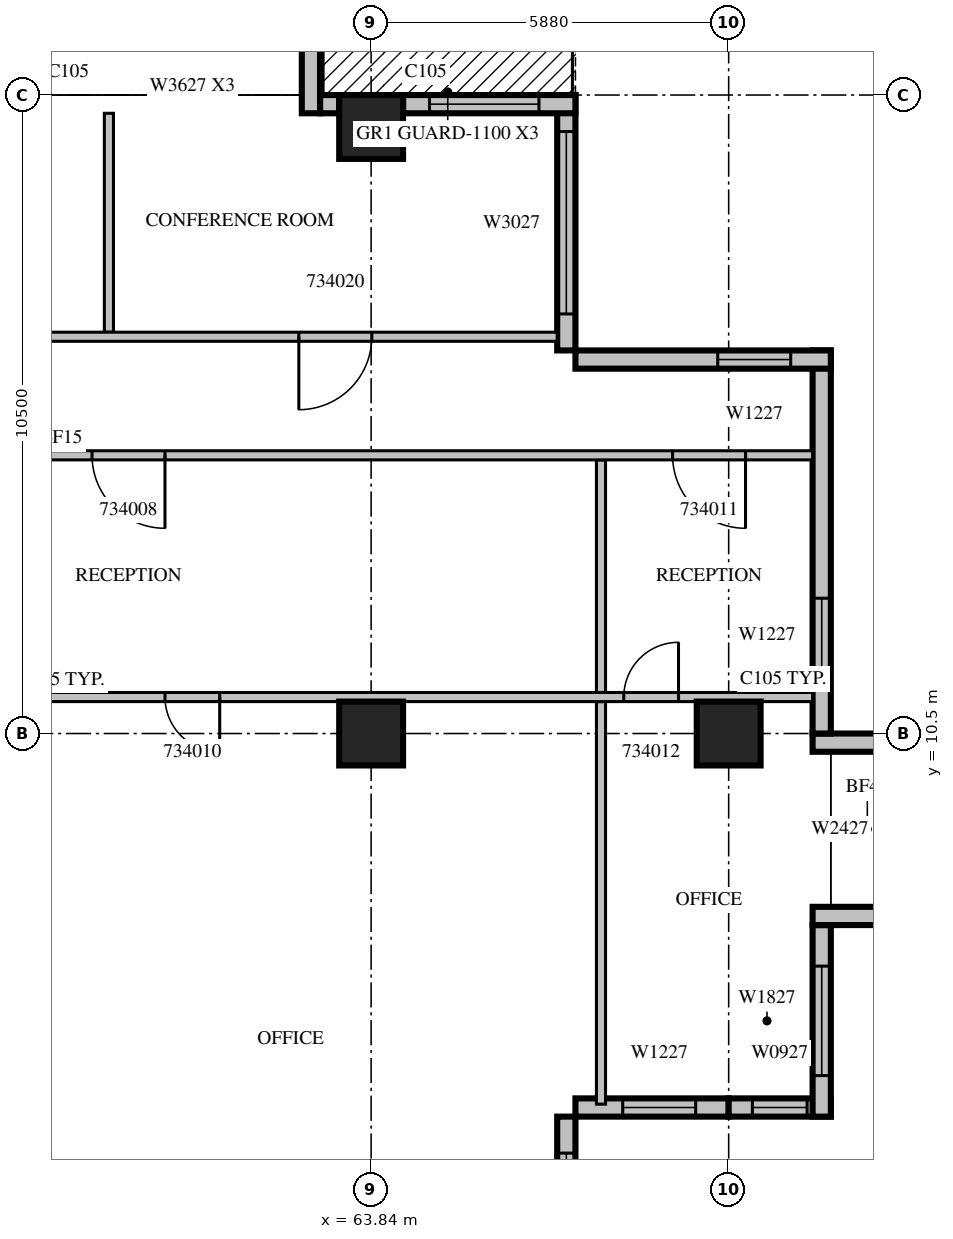
"""IFC4 building model, lengths in metres.
Left out: names, types, materials, properties, quantities, classifications, styles, units other than length and angle.
Written with IfcOpenShell. Run it as: python <this file> out.ifc"""

import sys

from ifc_helpers import new_model, si_unit, direction, frame, frame_2d, origin, origin_2d, place, context, subcontext, project, spatial, rectangle, extrude, source, transform, mapped, element, fill, save


model = new_model("IFC4")
c1 = context("Model", 3, precision=1e-05, world=origin(), true_north=direction((0.0, 1.0)))
c2 = subcontext(c1, "Body", "Model", "MODEL_VIEW")
j1 = project(units=[si_unit("LENGTHUNIT", "METRE"), si_unit("PLANEANGLEUNIT", "RADIAN")], contexts=[c1])
p1 = place(None, origin())
s1 = spatial("IfcSite", under=j1, at=p1, CompositionType="ELEMENT")
p2 = place(p1, origin())
s2 = spatial("IfcBuilding", under=s1, at=p2, CompositionType="ELEMENT")
p3 = place(p2, frame((0.0, 0.0, 153.9)))
s3 = spatial("IfcBuildingStorey", under=s2, at=p3, CompositionType="ELEMENT", Elevation=153.9)
m1 = source(origin(), c2, "Body", "SweptSolid", [
    extrude(rectangle(XDim=1.05, YDim=1.05, at=origin_2d()), origin(), (0.0, 0.0, 1.0), 4.2),
])
for number, where, z_axis, x_axis in (
    (1, (63.84, 10.5, 0.0), (0.0, 0.0, 1.0), (1.0, 0.0, 0.0)),
    (2, (69.72, 10.5, 0.0), (0.0, 0.0, 1.0), (1.0, 0.0, 0.0)),
    (3, (63.84, 20.475, 0.0), (0.0, 0.0, 1.0), (1.0, 0.0, 0.0)),
):
    element("IfcColumn", number, at=place(p3, frame(where, z_axis=z_axis, x_axis=x_axis)), inside=s3, PredefinedType="COLUMN", context=c2, shape_type="MappedRepresentation", body=[
        mapped(m1, transform((0.0, 0.0, 0.0), scale=1.0)),
    ])
m2 = source(origin(), c2, "Body", "SweptSolid", [
    extrude(rectangle(XDim=4.2, YDim=0.3, at=frame_2d((2.1, 0.0))), origin(), (0.0, 0.0, 1.0), 3.8),
])
p4 = place(p3, frame((67.05, 0.0, 0.0), z_axis=(0.0, 0.0, 1.0), x_axis=(0.0, 1.0, 0.0)))
e4 = element("IfcWall", 4, at=p4, inside=s3, PredefinedType="STANDARD", context=c2, shape_type="MappedRepresentation", body=[
    mapped(m2, transform((0.0, 0.0, 0.0), scale=1.0)),
])
m3 = source(origin(), c2, "Body", "SweptSolid", [
    extrude(rectangle(XDim=3.0, YDim=2.7, at=frame_2d((1.5, 1.35))), frame((0.0, 0.16, 0.0), z_axis=(0.0, -1.0, 0.0), x_axis=(1.0, 0.0, 0.0)), (0.0, 0.0, 1.0), 0.32),
])
p5 = place(p4, frame((0.6, 0.0, 0.6)))
e5 = element("IfcOpeningElement", 5, at=p5, cuts=e4, PredefinedType="OPENING", context=c2, shape_type="MappedRepresentation", body=[
    mapped(m3, transform((0.0, 0.0, 0.0), scale=1.0)),
])
m4 = source(origin(), c2, "Body", "SweptSolid", [
    extrude(rectangle(XDim=2.52, YDim=0.3, at=frame_2d((1.26, 0.0))), origin(), (0.0, 0.0, 1.0), 3.8),
])
p6 = place(p3, frame((67.2, 4.35, 0.0), z_axis=(0.0, 0.0, 1.0), x_axis=(1.0, 0.0, 0.0)))
e6 = element("IfcWall", 6, at=p6, inside=s3, PredefinedType="STANDARD", context=c2, shape_type="MappedRepresentation", body=[
    mapped(m4, transform((0.0, 0.0, 0.0), scale=1.0)),
])
m5 = source(origin(), c2, "Body", "SweptSolid", [
    extrude(rectangle(XDim=1.2, YDim=2.7, at=frame_2d((0.6, 1.35))), frame((0.0, 0.16, 0.0), z_axis=(0.0, -1.0, 0.0), x_axis=(1.0, 0.0, 0.0)), (0.0, 0.0, 1.0), 0.32),
])
p7 = place(p6, frame((0.777, 0.0, 0.6)))
e7 = element("IfcOpeningElement", 7, at=p7, cuts=e6, PredefinedType="OPENING", context=c2, shape_type="MappedRepresentation", body=[
    mapped(m5, transform((0.0, 0.0, 0.0), scale=1.0)),
])
m6 = source(origin(), c2, "Body", "SweptSolid", [
    extrude(rectangle(XDim=1.68, YDim=0.3, at=frame_2d((0.84, 0.0))), origin(), (0.0, 0.0, 1.0), 3.8),
])
p8 = place(p3, frame((69.72, 4.35, 0.0), z_axis=(0.0, 0.0, 1.0), x_axis=(1.0, 0.0, 0.0)))
e8 = element("IfcWall", 8, at=p8, inside=s3, PredefinedType="STANDARD", context=c2, shape_type="MappedRepresentation", body=[
    mapped(m6, transform((0.0, 0.0, 0.0), scale=1.0)),
])
m7 = source(origin(), c2, "Body", "SweptSolid", [
    extrude(rectangle(XDim=0.9, YDim=2.7, at=frame_2d((0.45, 1.35))), frame((0.0, 0.16, 0.0), z_axis=(0.0, -1.0, 0.0), x_axis=(1.0, 0.0, 0.0)), (0.0, 0.0, 1.0), 0.32),
])
p9 = place(p8, frame((0.39, 0.0, 0.6)))
e9 = element("IfcOpeningElement", 9, at=p9, cuts=e8, PredefinedType="OPENING", context=c2, shape_type="MappedRepresentation", body=[
    mapped(m7, transform((0.0, 0.0, 0.0), scale=1.0)),
])
m8 = source(origin(), c2, "Body", "SweptSolid", [
    extrude(rectangle(XDim=3.15, YDim=0.3, at=frame_2d((1.575, 0.0))), origin(), (0.0, 0.0, 1.0), 3.8),
])
p10 = place(p3, frame((71.25, 4.2, 0.0), z_axis=(0.0, 0.0, 1.0), x_axis=(0.0, 1.0, 0.0)))
e10 = element("IfcWall", 10, at=p10, inside=s3, PredefinedType="STANDARD", context=c2, shape_type="MappedRepresentation", body=[
    mapped(m8, transform((0.0, 0.0, 0.0), scale=1.0)),
])
m9 = source(origin(), c2, "Body", "SweptSolid", [
    extrude(rectangle(XDim=1.8, YDim=2.7, at=frame_2d((0.9, 1.35))), frame((0.0, 0.16, 0.0), z_axis=(0.0, -1.0, 0.0), x_axis=(1.0, 0.0, 0.0)), (0.0, 0.0, 1.0), 0.32),
])
p11 = place(p10, frame((0.675, 0.0, 0.6)))
e11 = element("IfcOpeningElement", 11, at=p11, cuts=e10, PredefinedType="OPENING", context=c2, shape_type="MappedRepresentation", body=[
    mapped(m9, transform((0.0, 0.0, 0.0), scale=1.0)),
])
m10 = source(origin(), c2, "Body", "SweptSolid", [
    extrude(rectangle(XDim=1.2, YDim=0.3, at=frame_2d((0.6, 0.0))), origin(), (0.0, 0.0, 1.0), 3.8),
])
for number, where, z_axis, x_axis in (
    (12, (71.1, 7.5, 0.0), (0.0, 0.0, 1.0), (1.0, 0.0, 0.0)),
    (13, (71.1, 10.35, 0.0), (0.0, 0.0, 1.0), (1.0, 0.0, 0.0)),
):
    element("IfcWall", number, at=place(p3, frame(where, z_axis=z_axis, x_axis=x_axis)), inside=s3, PredefinedType="STANDARD", context=c2, shape_type="MappedRepresentation", body=[
        mapped(m10, transform((0.0, 0.0, 0.0), scale=1.0)),
    ])
m11 = source(origin(), c2, "Body", "SweptSolid", [
    extrude(rectangle(XDim=6.3, YDim=0.3, at=frame_2d((3.15, 0.0))), origin(), (0.0, 0.0, 1.0), 3.8),
])
p12 = place(p3, frame((71.25, 10.5, 0.0), z_axis=(0.0, 0.0, 1.0), x_axis=(0.0, 1.0, 0.0)))
e14 = element("IfcWall", 14, at=p12, inside=s3, PredefinedType="STANDARD", context=c2, shape_type="MappedRepresentation", body=[
    mapped(m11, transform((0.0, 0.0, 0.0), scale=1.0)),
])
p13 = place(p12, frame((1.025, 0.0, 0.6)))
e15 = element("IfcOpeningElement", 15, at=p13, cuts=e14, PredefinedType="OPENING", context=c2, shape_type="MappedRepresentation", body=[
    mapped(m5, transform((0.0, 0.0, 0.0), scale=1.0)),
])
p14 = place(p3, frame((71.4, 16.65, 0.0), z_axis=(0.0, 0.0, 1.0), x_axis=(-1.0, 0.0, 0.0)))
e16 = element("IfcWall", 16, at=p14, inside=s3, PredefinedType="STANDARD", context=c2, shape_type="MappedRepresentation", body=[
    mapped(m2, transform((0.0, 0.0, 0.0), scale=1.0)),
])
p15 = place(p14, frame((0.66, 0.0, 0.6)))
e17 = element("IfcOpeningElement", 17, at=p15, cuts=e16, PredefinedType="OPENING", context=c2, shape_type="MappedRepresentation", body=[
    mapped(m5, transform((0.0, 0.0, 0.0), scale=1.0)),
])
p16 = place(p3, frame((67.05, 16.8, 0.0), z_axis=(0.0, 0.0, 1.0), x_axis=(0.0, 1.0, 0.0)))
e18 = element("IfcWall", 18, at=p16, inside=s3, PredefinedType="STANDARD", context=c2, shape_type="MappedRepresentation", body=[
    mapped(m2, transform((0.0, 0.0, 0.0), scale=1.0)),
])
p17 = place(p16, frame((0.6, 0.0, 0.6)))
e19 = element("IfcOpeningElement", 19, at=p17, cuts=e18, PredefinedType="OPENING", context=c2, shape_type="MappedRepresentation", body=[
    mapped(m3, transform((0.0, 0.0, 0.0), scale=1.0)),
])
m12 = source(origin(), c2, "Body", "SweptSolid", [
    extrude(rectangle(XDim=2.835, YDim=0.3, at=frame_2d((1.417, 0.0))), origin(), (0.0, 0.0, 1.0), 3.8),
])
p18 = place(p3, frame((67.2, 20.85, 0.0), z_axis=(0.0, 0.0, 1.0), x_axis=(-1.0, 0.0, 0.0)))
e20 = element("IfcWall", 20, at=p18, inside=s3, PredefinedType="STANDARD", context=c2, shape_type="MappedRepresentation", body=[
    mapped(m12, transform((0.0, 0.0, 0.0), scale=1.0)),
])
m13 = source(origin(), c2, "Body", "SweptSolid", [
    extrude(rectangle(XDim=1.8, YDim=2.4, at=frame_2d((0.9, 1.2))), frame((0.0, 0.16, 0.0), z_axis=(0.0, -1.0, 0.0), x_axis=(1.0, 0.0, 0.0)), (0.0, 0.0, 1.0), 0.32),
])
p19 = place(p18, frame((0.6, 0.0, 0.0)))
e21 = element("IfcOpeningElement", 21, at=p19, cuts=e20, PredefinedType="OPENING", context=c2, shape_type="MappedRepresentation", body=[
    mapped(m13, transform((0.0, 0.0, 0.0), scale=1.0)),
])
m14 = source(origin(), c2, "Body", "SweptSolid", [
    extrude(rectangle(XDim=0.315, YDim=0.3, at=frame_2d((0.158, 0.0))), origin(), (0.0, 0.0, 1.0), 3.8),
])
p20 = place(p3, frame((63.315, 20.85, 0.0), z_axis=(0.0, 0.0, 1.0), x_axis=(-1.0, 0.0, 0.0)))
e22 = element("IfcWall", 22, at=p20, inside=s3, PredefinedType="STANDARD", context=c2, shape_type="MappedRepresentation", body=[
    mapped(m14, transform((0.0, 0.0, 0.0), scale=1.0)),
])
p21 = place(p3, frame((62.85, 20.7, 0.0), z_axis=(0.0, 0.0, 1.0), x_axis=(0.0, 1.0, 0.0)))
e23 = element("IfcWall", 23, at=p21, inside=s3, PredefinedType="STANDARD", context=c2, shape_type="MappedRepresentation", body=[
    mapped(m10, transform((0.0, 0.0, 0.0), scale=1.0)),
])
m15 = source(origin(), c2, "Body", "SweptSolid", [
    extrude(rectangle(XDim=6.62, YDim=0.15, at=frame_2d((3.31, 0.0))), origin(), (0.0, 0.0, 1.0), 3.8),
])
p22 = place(p3, frame((67.62, 4.405, 0.0), z_axis=(0.0, 0.0, 1.0), x_axis=(0.0, 1.0, 0.0)))
e24 = element("IfcWall", 24, at=p22, inside=s3, PredefinedType="PARTITIONING", context=c2, shape_type="MappedRepresentation", body=[
    mapped(m15, transform((0.0, 0.0, 0.0), scale=1.0)),
])
m16 = source(origin(), c2, "Body", "SweptSolid", [
    extrude(rectangle(XDim=3.825, YDim=0.15, at=frame_2d((1.913, 0.0))), origin(), (0.0, 0.0, 1.0), 3.8),
])
p23 = place(p3, frame((67.62, 11.175, 0.0), z_axis=(0.0, 0.0, 1.0), x_axis=(0.0, 1.0, 0.0)))
e25 = element("IfcWall", 25, at=p23, inside=s3, PredefinedType="PARTITIONING", context=c2, shape_type="MappedRepresentation", body=[
    mapped(m16, transform((0.0, 0.0, 0.0), scale=1.0)),
])
m17 = source(origin(), c2, "Body", "SweptSolid", [
    extrude(rectangle(XDim=24.9, YDim=0.15, at=frame_2d((12.45, 0.0))), origin(), (0.0, 0.0, 1.0), 3.8),
])
p24 = place(p3, frame((71.1, 11.1, 0.0), z_axis=(0.0, 0.0, 1.0), x_axis=(-1.0, 0.0, 0.0)))
e26 = element("IfcWall", 26, at=p24, inside=s3, PredefinedType="PARTITIONING", context=c2, shape_type="MappedRepresentation", body=[
    mapped(m17, transform((0.0, 0.0, 0.0), scale=1.0)),
])
m18 = source(origin(), c2, "Body", "SweptSolid", [
    extrude(rectangle(XDim=1.1, YDim=2.1, at=frame_2d((0.55, 1.05))), frame((0.0, 0.085, 0.0), z_axis=(0.0, -1.0, 0.0), x_axis=(1.0, 0.0, 0.0)), (0.0, 0.0, 1.0), 0.17),
])
p25 = place(p24, frame((19.988, 0.0, 0.0)))
e27 = element("IfcOpeningElement", 27, at=p25, cuts=e26, PredefinedType="OPENING", context=c2, shape_type="MappedRepresentation", body=[
    mapped(m18, transform((0.0, 0.0, 0.0), scale=1.0)),
])
m19 = source(origin(), c2, "Body", "SweptSolid", [
    extrude(rectangle(XDim=0.9, YDim=2.1, at=frame_2d((0.45, 1.05))), frame((0.0, 0.085, 0.0), z_axis=(0.0, -1.0, 0.0), x_axis=(1.0, 0.0, 0.0)), (0.0, 0.0, 1.0), 0.17),
])
p26 = place(p24, frame((15.63, 0.0, 0.0)))
e28 = element("IfcOpeningElement", 28, at=p26, cuts=e26, PredefinedType="OPENING", context=c2, shape_type="MappedRepresentation", body=[
    mapped(m19, transform((0.0, 0.0, 0.0), scale=1.0)),
])
p27 = place(p24, frame((9.75, 0.0, 0.0)))
e29 = element("IfcOpeningElement", 29, at=p27, cuts=e26, PredefinedType="OPENING", context=c2, shape_type="MappedRepresentation", body=[
    mapped(m19, transform((0.0, 0.0, 0.0), scale=1.0)),
])
p28 = place(p24, frame((2.205, 0.0, 0.0)))
e30 = element("IfcOpeningElement", 30, at=p28, cuts=e26, PredefinedType="OPENING", context=c2, shape_type="MappedRepresentation", body=[
    mapped(m19, transform((0.0, 0.0, 0.0), scale=1.0)),
])
m20 = source(origin(), c2, "Body", "SweptSolid", [
    extrude(rectangle(XDim=3.6, YDim=0.15, at=frame_2d((1.8, 0.0))), origin(), (0.0, 0.0, 1.0), 3.8),
])
p29 = place(p3, frame((59.528, 20.7, 0.0), z_axis=(0.0, 0.0, 1.0), x_axis=(0.0, -1.0, 0.0)))
e31 = element("IfcWall", 31, at=p29, inside=s3, PredefinedType="PARTITIONING", context=c2, shape_type="MappedRepresentation", body=[
    mapped(m20, transform((0.0, 0.0, 0.0), scale=1.0)),
])
p30 = place(p3, frame((71.1, 15.075, 0.0), z_axis=(0.0, 0.0, 1.0), x_axis=(-1.0, 0.0, 0.0)))
e32 = element("IfcWall", 32, at=p30, inside=s3, PredefinedType="PARTITIONING", context=c2, shape_type="MappedRepresentation", body=[
    mapped(m17, transform((0.0, 0.0, 0.0), scale=1.0)),
])
p31 = place(p30, frame((19.754, 0.0, 0.0)))
e33 = element("IfcOpeningElement", 33, at=p31, cuts=e32, PredefinedType="OPENING", context=c2, shape_type="MappedRepresentation", body=[
    mapped(m18, transform((0.0, 0.0, 0.0), scale=1.0)),
])
p32 = place(p30, frame((22.794, 0.0, 0.0)))
e34 = element("IfcOpeningElement", 34, at=p32, cuts=e32, PredefinedType="OPENING", context=c2, shape_type="MappedRepresentation", body=[
    mapped(m19, transform((0.0, 0.0, 0.0), scale=1.0)),
])
m21 = source(origin(), c2, "Body", "SweptSolid", [
    extrude(rectangle(XDim=1.2, YDim=2.1, at=frame_2d((0.6, 1.05))), frame((0.0, 0.085, 0.0), z_axis=(0.0, -1.0, 0.0), x_axis=(1.0, 0.0, 0.0)), (0.0, 0.0, 1.0), 0.17),
])
p33 = place(p30, frame((10.65, 0.0, 0.0)))
e35 = element("IfcOpeningElement", 35, at=p33, cuts=e32, PredefinedType="OPENING", context=c2, shape_type="MappedRepresentation", body=[
    mapped(m21, transform((0.0, 0.0, 0.0), scale=1.0)),
])
p34 = place(p30, frame((1.103, 0.0, 0.0)))
e36 = element("IfcOpeningElement", 36, at=p34, cuts=e32, PredefinedType="OPENING", context=c2, shape_type="MappedRepresentation", body=[
    mapped(m21, transform((0.0, 0.0, 0.0), scale=1.0)),
])
m22 = source(origin(), c2, "Body", "SweptSolid", [
    extrude(rectangle(XDim=37.5, YDim=0.15, at=frame_2d((18.75, 0.0))), origin(), (0.0, 0.0, 1.0), 3.8),
])
p35 = place(p3, frame((29.4, 17.025, 0.0), z_axis=(0.0, 0.0, 1.0), x_axis=(1.0, 0.0, 0.0)))
e37 = element("IfcWall", 37, at=p35, inside=s3, PredefinedType="PARTITIONING", context=c2, shape_type="MappedRepresentation", body=[
    mapped(m22, transform((0.0, 0.0, 0.0), scale=1.0)),
])
m23 = source(origin(), c2, "Body", "SweptSolid", [
    extrude(rectangle(XDim=1.0, YDim=2.1, at=frame_2d((0.5, 1.05))), frame((0.0, 0.085, 0.0), z_axis=(0.0, -1.0, 0.0), x_axis=(1.0, 0.0, 0.0)), (0.0, 0.0, 1.0), 0.17),
])
p36 = place(p35, frame((1.357, 0.0, 0.0)))
e38 = element("IfcOpeningElement", 38, at=p36, cuts=e37, PredefinedType="OPENING", context=c2, shape_type="MappedRepresentation", body=[
    mapped(m23, transform((0.0, 0.0, 0.0), scale=1.0)),
])
p37 = place(p35, frame((4.669, 0.0, 0.0)))
e39 = element("IfcOpeningElement", 39, at=p37, cuts=e37, PredefinedType="OPENING", context=c2, shape_type="MappedRepresentation", body=[
    mapped(m23, transform((0.0, 0.0, 0.0), scale=1.0)),
])
p38 = place(p35, frame((7.012, 0.0, 0.0)))
e40 = element("IfcOpeningElement", 40, at=p38, cuts=e37, PredefinedType="OPENING", context=c2, shape_type="MappedRepresentation", body=[
    mapped(m23, transform((0.0, 0.0, 0.0), scale=1.0)),
])
p39 = place(p35, frame((10.05, 0.0, 0.0)))
e41 = element("IfcOpeningElement", 41, at=p39, cuts=e37, PredefinedType="OPENING", context=c2, shape_type="MappedRepresentation", body=[
    mapped(m19, transform((0.0, 0.0, 0.0), scale=1.0)),
])
p40 = place(p35, frame((14.62, 0.0, 0.0)))
e42 = element("IfcOpeningElement", 42, at=p40, cuts=e37, PredefinedType="OPENING", context=c2, shape_type="MappedRepresentation", body=[
    mapped(m23, transform((0.0, 0.0, 0.0), scale=1.0)),
])
p41 = place(p35, frame((19.66, 0.0, 0.0)))
e43 = element("IfcOpeningElement", 43, at=p41, cuts=e37, PredefinedType="OPENING", context=c2, shape_type="MappedRepresentation", body=[
    mapped(m23, transform((0.0, 0.0, 0.0), scale=1.0)),
])
p42 = place(p35, frame((25.804, 0.0, 0.0)))
e44 = element("IfcOpeningElement", 44, at=p42, cuts=e37, PredefinedType="OPENING", context=c2, shape_type="MappedRepresentation", body=[
    mapped(m21, transform((0.0, 0.0, 0.0), scale=1.0)),
])
p43 = place(p35, frame((33.251, 0.0, 0.0)))
e45 = element("IfcOpeningElement", 45, at=p43, cuts=e37, PredefinedType="OPENING", context=c2, shape_type="MappedRepresentation", body=[
    mapped(m21, transform((0.0, 0.0, 0.0), scale=1.0)),
])
m24 = source(origin(), c2, "Body", "SweptSolid", [
    extrude(rectangle(XDim=3.0, YDim=2.7, at=frame_2d((1.5, 1.35))), frame((0.0, 0.03, 0.0), z_axis=(0.0, -1.0, 0.0), x_axis=(1.0, 0.0, 0.0)), (0.0, 0.0, 1.0), 0.06),
])
p44 = place(p5, origin())
e46 = element("IfcWindow", 46, at=p44, inside=s3, PartitioningType="SINGLE_PANEL", PredefinedType="WINDOW", context=c2, shape_type="MappedRepresentation", body=[
    mapped(m24, transform((0.0, 0.0, 0.0), scale=1.0)),
])
fill(e5, e46)
m25 = source(origin(), c2, "Body", "SweptSolid", [
    extrude(rectangle(XDim=1.2, YDim=2.7, at=frame_2d((0.6, 1.35))), frame((0.0, 0.03, 0.0), z_axis=(0.0, -1.0, 0.0), x_axis=(1.0, 0.0, 0.0)), (0.0, 0.0, 1.0), 0.06),
])
p45 = place(p7, origin())
e47 = element("IfcWindow", 47, at=p45, inside=s3, PartitioningType="SINGLE_PANEL", PredefinedType="WINDOW", context=c2, shape_type="MappedRepresentation", body=[
    mapped(m25, transform((0.0, 0.0, 0.0), scale=1.0)),
])
fill(e7, e47)
m26 = source(origin(), c2, "Body", "SweptSolid", [
    extrude(rectangle(XDim=0.9, YDim=2.7, at=frame_2d((0.45, 1.35))), frame((0.0, 0.03, 0.0), z_axis=(0.0, -1.0, 0.0), x_axis=(1.0, 0.0, 0.0)), (0.0, 0.0, 1.0), 0.06),
])
p46 = place(p9, origin())
e48 = element("IfcWindow", 48, at=p46, inside=s3, PartitioningType="SINGLE_PANEL", PredefinedType="WINDOW", context=c2, shape_type="MappedRepresentation", body=[
    mapped(m26, transform((0.0, 0.0, 0.0), scale=1.0)),
])
fill(e9, e48)
m27 = source(origin(), c2, "Body", "SweptSolid", [
    extrude(rectangle(XDim=1.8, YDim=2.7, at=frame_2d((0.9, 1.35))), frame((0.0, 0.03, 0.0), z_axis=(0.0, -1.0, 0.0), x_axis=(1.0, 0.0, 0.0)), (0.0, 0.0, 1.0), 0.06),
])
p47 = place(p11, origin())
e49 = element("IfcWindow", 49, at=p47, inside=s3, PartitioningType="SINGLE_PANEL", PredefinedType="WINDOW", context=c2, shape_type="MappedRepresentation", body=[
    mapped(m27, transform((0.0, 0.0, 0.0), scale=1.0)),
])
fill(e11, e49)
p48 = place(p13, origin())
e50 = element("IfcWindow", 50, at=p48, inside=s3, PartitioningType="SINGLE_PANEL", PredefinedType="WINDOW", context=c2, shape_type="MappedRepresentation", body=[
    mapped(m25, transform((0.0, 0.0, 0.0), scale=1.0)),
])
fill(e15, e50)
p49 = place(p15, origin())
e51 = element("IfcWindow", 51, at=p49, inside=s3, PartitioningType="SINGLE_PANEL", PredefinedType="WINDOW", context=c2, shape_type="MappedRepresentation", body=[
    mapped(m25, transform((0.0, 0.0, 0.0), scale=1.0)),
])
fill(e17, e51)
p50 = place(p17, origin())
e52 = element("IfcWindow", 52, at=p50, inside=s3, PartitioningType="SINGLE_PANEL", PredefinedType="WINDOW", context=c2, shape_type="MappedRepresentation", body=[
    mapped(m24, transform((0.0, 0.0, 0.0), scale=1.0)),
])
fill(e19, e52)
m28 = source(origin(), c2, "Body", "SweptSolid", [
    extrude(rectangle(XDim=1.8, YDim=2.4, at=frame_2d((0.9, 1.2))), frame((0.0, 0.025, 0.0), z_axis=(0.0, -1.0, 0.0), x_axis=(1.0, 0.0, 0.0)), (0.0, 0.0, 1.0), 0.05),
])
p51 = place(p19, origin())
e53 = element("IfcDoor", 53, at=p51, inside=s3, OperationType="SLIDING_TO_LEFT", PredefinedType="DOOR", context=c2, shape_type="MappedRepresentation", body=[
    mapped(m28, transform((0.0, 0.0, 0.0), scale=1.0)),
])
fill(e21, e53)
m29 = source(origin(), c2, "Body", "SweptSolid", [
    extrude(rectangle(XDim=1.2, YDim=2.1, at=frame_2d((0.6, 1.05))), frame((0.0, 0.025, 0.0), z_axis=(0.0, -1.0, 0.0), x_axis=(1.0, 0.0, 0.0)), (0.0, 0.0, 1.0), 0.05),
])
p52 = place(p33, origin())
e54 = element("IfcDoor", 54, at=p52, inside=s3, OperationType="SINGLE_SWING_LEFT", PredefinedType="DOOR", context=c2, shape_type="MappedRepresentation", body=[
    mapped(m29, transform((0.0, 0.0, 0.0), scale=1.0)),
])
fill(e35, e54)
m30 = source(origin(), c2, "Body", "SweptSolid", [
    extrude(rectangle(XDim=0.9, YDim=2.1, at=frame_2d((0.45, 1.05))), frame((0.0, 0.025, 0.0), z_axis=(0.0, -1.0, 0.0), x_axis=(1.0, 0.0, 0.0)), (0.0, 0.0, 1.0), 0.05),
])
p53 = place(p27, origin())
e55 = element("IfcDoor", 55, at=p53, inside=s3, OperationType="SINGLE_SWING_LEFT", PredefinedType="DOOR", context=c2, shape_type="MappedRepresentation", body=[
    mapped(m30, transform((0.0, 0.0, 0.0), scale=1.0)),
])
fill(e29, e55)
p54 = place(p34, origin())
e56 = element("IfcDoor", 56, at=p54, inside=s3, OperationType="SINGLE_SWING_LEFT", PredefinedType="DOOR", context=c2, shape_type="MappedRepresentation", body=[
    mapped(m29, transform((0.0, 0.0, 0.0), scale=1.0)),
])
fill(e36, e56)
p55 = place(p28, origin())
e57 = element("IfcDoor", 57, at=p55, inside=s3, OperationType="SINGLE_SWING_RIGHT", PredefinedType="DOOR", context=c2, shape_type="MappedRepresentation", body=[
    mapped(m30, transform((0.0, 0.0, 0.0), scale=1.0)),
])
fill(e30, e57)
p56 = place(p43, origin())
e58 = element("IfcDoor", 58, at=p56, inside=s3, OperationType="SINGLE_SWING_RIGHT", PredefinedType="DOOR", context=c2, shape_type="MappedRepresentation", body=[
    mapped(m29, transform((0.0, 0.0, 0.0), scale=1.0)),
])
fill(e45, e58)
save(model, sys.argv[1])
